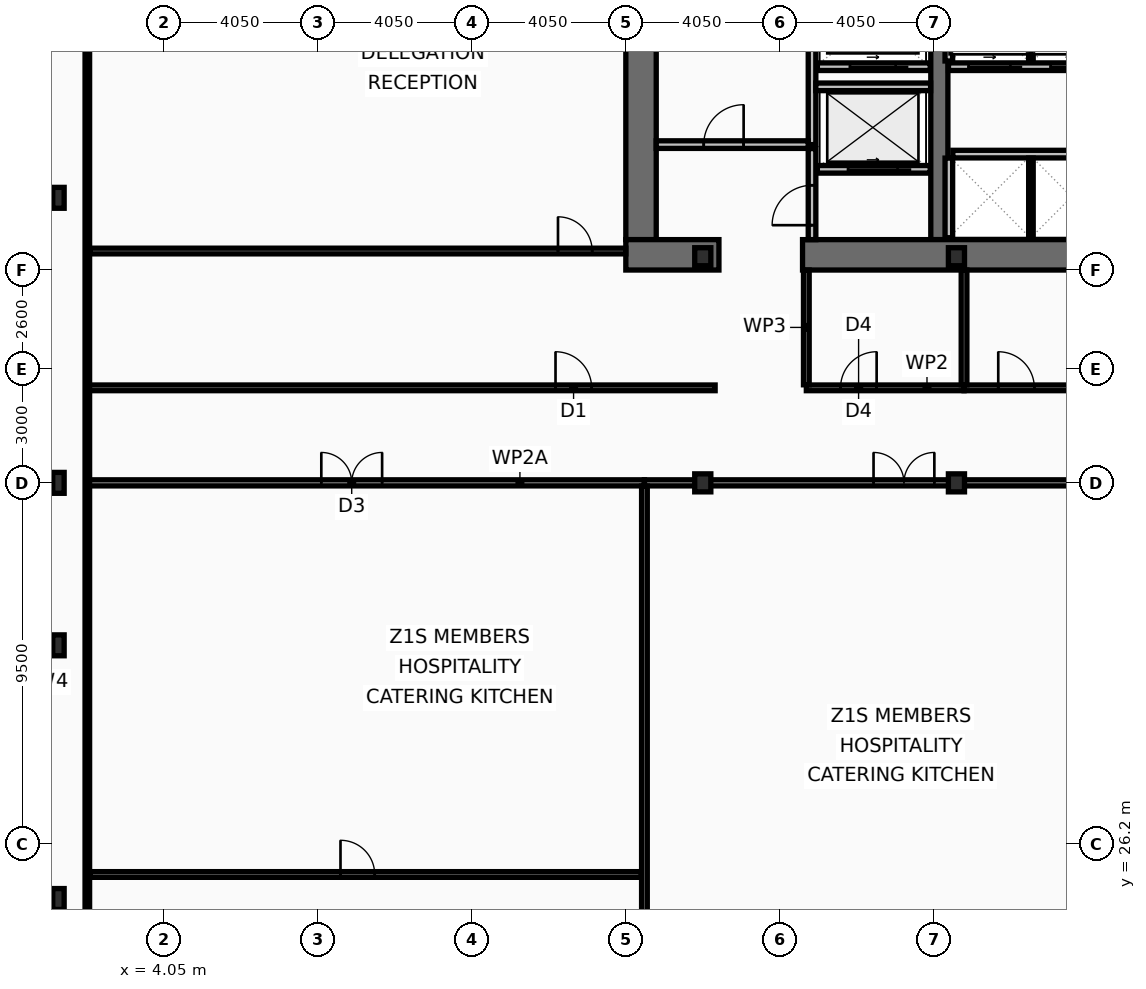
"""IFC4 building model, lengths in metres.
Left out: names, types, materials, properties, quantities, classifications, styles, units other than length and angle.
Written with IfcOpenShell. Run it as: python <this file> out.ifc"""

import sys

from ifc_helpers import new_model, si_unit, direction, frame, frame_2d, origin, origin_2d, place, context, subcontext, project, spatial, rectangle, i_section, extrude, element, fill, save


model = new_model("IFC4")
c1 = context("Model", 3, precision=1e-05, world=origin(), true_north=direction((0.0, 1.0)))
c2 = subcontext(c1, "Body", "Model", "MODEL_VIEW")
j1 = project(units=[si_unit("LENGTHUNIT", "METRE"), si_unit("PLANEANGLEUNIT", "RADIAN")], contexts=[c1])
p1 = place(None, origin())
s1 = spatial("IfcSite", under=j1, at=p1, CompositionType="ELEMENT")
p2 = place(p1, origin())
s2 = spatial("IfcBuilding", under=s1, at=p2, CompositionType="ELEMENT")
p3 = place(p2, frame((0.0, 0.0, 77.8)))
s3 = spatial("IfcBuildingStorey", under=s2, at=p3, CompositionType="ELEMENT", Elevation=77.8)
p4 = place(p3, frame((16.6, 42.1, 0.0), z_axis=(0.0, 0.0, 1.0), x_axis=(0.0, 1.0, 0.0)))
e1 = element("IfcWall", 1, at=p4, inside=s3, PredefinedType="SHEAR", context=c2, shape_type="SweptSolid", body=[
    extrude(rectangle(XDim=10.8, YDim=0.8, at=frame_2d((5.4, 0.0))), origin(), (0.0, 0.0, 1.0), 3.82),
])
p5 = place(p3, frame((24.45, 42.1, 0.0), z_axis=(0.0, 0.0, 1.0), x_axis=(0.0, 1.0, 0.0)))
e2 = element("IfcWall", 2, at=p5, inside=s3, PredefinedType="SHEAR", context=c2, shape_type="SweptSolid", body=[
    extrude(rectangle(XDim=10.8, YDim=0.45, at=frame_2d((5.4, 0.0))), origin(), (0.0, 0.0, 1.0), 3.82),
])
p6 = place(p3, frame((18.65, 41.7, 0.0), z_axis=(0.0, 0.0, 1.0), x_axis=(-1.0, 0.0, 0.0)))
e3 = element("IfcWall", 3, at=p6, inside=s3, PredefinedType="SHEAR", context=c2, shape_type="SweptSolid", body=[
    extrude(rectangle(XDim=2.45, YDim=0.8, at=frame_2d((1.225, 0.0))), origin(), (0.0, 0.0, 1.0), 3.82),
])
p7 = place(p3, frame((32.3, 41.7, 0.0), z_axis=(0.0, 0.0, 1.0), x_axis=(-1.0, 0.0, 0.0)))
e4 = element("IfcWall", 4, at=p7, inside=s3, PredefinedType="SHEAR", context=c2, shape_type="SweptSolid", body=[
    extrude(rectangle(XDim=11.45, YDim=0.8, at=frame_2d((5.725, 0.0))), origin(), (0.0, 0.0, 1.0), 3.82),
])
for number, where, z_axis, x_axis in (
    (5, (1.27, 24.75, 0.0), (0.0, 0.0, 1.0), (1.0, 0.0, 0.0)),
    (6, (1.27, 31.425, 0.0), (0.0, 0.0, 1.0), (1.0, 0.0, 0.0)),
    (7, (1.27, 35.7, 0.0), (0.0, 0.0, 1.0), (1.0, 0.0, 0.0)),
    (8, (1.27, 43.2, 0.0), (0.0, 0.0, 1.0), (1.0, 0.0, 0.0)),
):
    element("IfcColumn", number, at=place(p3, frame(where, z_axis=z_axis, x_axis=x_axis)), inside=s3, PredefinedType="COLUMN", context=c2, shape_type="SweptSolid", body=[
        extrude(i_section(OverallWidth=0.3, OverallDepth=0.55, WebThickness=0.015, FlangeThickness=0.029, at=origin_2d()), origin(), (0.0, 0.0, 1.0), 4.0),
    ])
for number, where, z_axis, x_axis in (
    (9, (18.225, 35.7, 0.0), (0.0, 0.0, 1.0), (1.0, 0.0, 0.0)),
    (10, (18.225, 41.65, 0.0), (0.0, 0.0, 1.0), (1.0, 0.0, 0.0)),
    (11, (24.9, 35.7, 0.0), (0.0, 0.0, 1.0), (1.0, 0.0, 0.0)),
    (12, (24.9, 41.65, 0.0), (0.0, 0.0, 1.0), (1.0, 0.0, 0.0)),
):
    element("IfcColumn", number, at=place(p3, frame(where, z_axis=z_axis, x_axis=x_axis)), inside=s3, PredefinedType="COLUMN", context=c2, shape_type="SweptSolid", body=[
        extrude(i_section(OverallWidth=0.424, OverallDepth=0.474, WebThickness=0.048, FlangeThickness=0.077, at=origin_2d()), origin(), (0.0, 0.0, 1.0), 4.0),
    ])
p8 = place(p3, frame((24.21, 43.95, 0.0), z_axis=(0.0, 0.0, 1.0), x_axis=(-1.0, 0.0, 0.0)))
e13 = element("IfcWall", 13, at=p8, inside=s3, PredefinedType="PARTITIONING", context=c2, shape_type="SweptSolid", body=[
    extrude(rectangle(XDim=2.97, YDim=0.2, at=frame_2d((1.485, 0.0))), origin(), (0.0, 0.0, 1.0), 3.82),
])
p9 = place(p8, frame((0.86, 0.0, 0.0)))
e14 = element("IfcOpeningElement", 14, at=p9, cuts=e13, PredefinedType="OPENING", context=c2, shape_type="SweptSolid", body=[
    extrude(rectangle(XDim=1.3, YDim=2.18, at=frame_2d((0.65, 1.09))), frame((0.0, 0.11, 0.0), z_axis=(0.0, -1.0, 0.0), x_axis=(1.0, 0.0, 0.0)), (0.0, 0.0, 1.0), 0.22),
])
p10 = place(p3, frame((24.21, 46.65, 0.0), z_axis=(0.0, 0.0, 1.0), x_axis=(-1.0, 0.0, 0.0)))
e15 = element("IfcWall", 15, at=p10, inside=s3, PredefinedType="PARTITIONING", context=c2, shape_type="SweptSolid", body=[
    extrude(rectangle(XDim=2.97, YDim=0.2, at=frame_2d((1.485, 0.0))), origin(), (0.0, 0.0, 1.0), 3.82),
])
p11 = place(p10, frame((0.91, 0.0, 0.0)))
e16 = element("IfcOpeningElement", 16, at=p11, cuts=e15, PredefinedType="OPENING", context=c2, shape_type="SweptSolid", body=[
    extrude(rectangle(XDim=1.2, YDim=2.18, at=frame_2d((0.6, 1.09))), frame((0.0, 0.11, 0.0), z_axis=(0.0, -1.0, 0.0), x_axis=(1.0, 0.0, 0.0)), (0.0, 0.0, 1.0), 0.22),
])
p12 = place(p3, frame((31.22, 46.65, 0.0), z_axis=(0.0, 0.0, 1.0), x_axis=(-1.0, 0.0, 0.0)))
e17 = element("IfcWall", 17, at=p12, inside=s3, PredefinedType="PARTITIONING", context=c2, shape_type="SweptSolid", body=[
    extrude(rectangle(XDim=6.53, YDim=0.2, at=frame_2d((3.265, 0.0))), origin(), (0.0, 0.0, 1.0), 3.82),
])
p13 = place(p12, frame((4.9, 0.0, 0.0)))
e18 = element("IfcOpeningElement", 18, at=p13, cuts=e17, PredefinedType="OPENING", context=c2, shape_type="SweptSolid", body=[
    extrude(rectangle(XDim=1.1, YDim=2.18, at=frame_2d((0.55, 1.09))), frame((0.0, 0.11, 0.0), z_axis=(0.0, -1.0, 0.0), x_axis=(1.0, 0.0, 0.0)), (0.0, 0.0, 1.0), 0.22),
])
p14 = place(p12, frame((2.74, 0.0, 0.0)))
e19 = element("IfcOpeningElement", 19, at=p14, cuts=e17, PredefinedType="OPENING", context=c2, shape_type="SweptSolid", body=[
    extrude(rectangle(XDim=1.1, YDim=2.18, at=frame_2d((0.55, 1.09))), frame((0.0, 0.11, 0.0), z_axis=(0.0, -1.0, 0.0), x_axis=(1.0, 0.0, 0.0)), (0.0, 0.0, 1.0), 0.22),
])
p15 = place(p12, frame((0.58, 0.0, 0.0)))
e20 = element("IfcOpeningElement", 20, at=p15, cuts=e17, PredefinedType="OPENING", context=c2, shape_type="SweptSolid", body=[
    extrude(rectangle(XDim=1.1, YDim=2.18, at=frame_2d((0.55, 1.09))), frame((0.0, 0.11, 0.0), z_axis=(0.0, -1.0, 0.0), x_axis=(1.0, 0.0, 0.0)), (0.0, 0.0, 1.0), 0.22),
])
p16 = place(p3, frame((21.1, 44.6, 0.0), z_axis=(0.0, 0.0, 1.0), x_axis=(0.0, 1.0, 0.0)))
e21 = element("IfcWall", 21, at=p16, inside=s3, PredefinedType="PARTITIONING", context=c2, shape_type="SweptSolid", body=[
    extrude(rectangle(XDim=4.3, YDim=0.2, at=frame_2d((2.15, 0.0))), origin(), (0.0, 0.0, 1.0), 3.82),
])
p17 = place(p3, frame((17.0, 44.6, 0.0), z_axis=(0.0, 0.0, 1.0), x_axis=(1.0, 0.0, 0.0)))
e22 = element("IfcWall", 22, at=p17, inside=s3, PredefinedType="PARTITIONING", context=c2, shape_type="SweptSolid", body=[
    extrude(rectangle(XDim=4.0, YDim=0.2, at=frame_2d((2.0, 0.0))), origin(), (0.0, 0.0, 1.0), 3.82),
])
p18 = place(p17, frame((1.25, 0.0, 0.0)))
e23 = element("IfcOpeningElement", 23, at=p18, cuts=e22, PredefinedType="OPENING", context=c2, shape_type="SweptSolid", body=[
    extrude(rectangle(XDim=1.05, YDim=2.15, at=frame_2d((0.525, 1.075))), frame((0.0, 0.11, 0.0), z_axis=(0.0, -1.0, 0.0), x_axis=(1.0, 0.0, 0.0)), (0.0, 0.0, 1.0), 0.22),
])
p19 = place(p3, frame((21.2, 46.12, 0.0), z_axis=(0.0, 0.0, 1.0), x_axis=(1.0, 0.0, 0.0)))
e24 = element("IfcWall", 24, at=p19, inside=s3, PredefinedType="PARTITIONING", context=c2, shape_type="SweptSolid", body=[
    extrude(rectangle(XDim=3.02, YDim=0.2, at=frame_2d((1.51, 0.0))), origin(), (0.0, 0.0, 1.0), 3.82),
])
p20 = place(p3, frame((21.1, 42.1, 0.0), z_axis=(0.0, 0.0, 1.0), x_axis=(0.0, 1.0, 0.0)))
e25 = element("IfcWall", 25, at=p20, inside=s3, PredefinedType="PARTITIONING", context=c2, shape_type="SweptSolid", body=[
    extrude(rectangle(XDim=2.395, YDim=0.2, at=frame_2d((1.198, 0.0))), origin(), (0.0, 0.0, 1.0), 3.82),
])
p21 = place(p20, frame((0.38, 0.0, 0.0)))
e26 = element("IfcOpeningElement", 26, at=p21, cuts=e25, PredefinedType="OPENING", context=c2, shape_type="SweptSolid", body=[
    extrude(rectangle(XDim=1.05, YDim=2.15, at=frame_2d((0.525, 1.075))), frame((0.0, 0.11, 0.0), z_axis=(0.0, -1.0, 0.0), x_axis=(1.0, 0.0, 0.0)), (0.0, 0.0, 1.0), 0.22),
])
p22 = place(p3, frame((24.7, 46.8, 0.0), z_axis=(0.0, 0.0, 1.0), x_axis=(0.0, 1.0, 0.0)))
e27 = element("IfcWall", 27, at=p22, inside=s3, PredefinedType="PARTITIONING", context=c2, shape_type="SweptSolid", body=[
    extrude(rectangle(XDim=2.095, YDim=0.2, at=frame_2d((1.047, 0.0))), origin(), (0.0, 0.0, 1.0), 3.82),
])
p23 = place(p3, frame((26.86, 46.8, 0.0), z_axis=(0.0, 0.0, 1.0), x_axis=(0.0, 1.0, 0.0)))
e28 = element("IfcWall", 28, at=p23, inside=s3, PredefinedType="PARTITIONING", context=c2, shape_type="SweptSolid", body=[
    extrude(rectangle(XDim=2.095, YDim=0.12, at=frame_2d((1.047, 0.0))), origin(), (0.0, 0.0, 1.0), 3.82),
])
p24 = place(p3, frame((24.805, 44.35, 0.0), z_axis=(0.0, 0.0, 1.0), x_axis=(1.0, 0.0, 0.0)))
e29 = element("IfcWall", 29, at=p24, inside=s3, PredefinedType="PARTITIONING", context=c2, shape_type="SweptSolid", body=[
    extrude(rectangle(XDim=6.27, YDim=0.2, at=frame_2d((3.135, 0.0))), origin(), (0.0, 0.0, 1.0), 3.82),
])
p25 = place(p3, frame((24.7, 42.15, 0.0), z_axis=(0.0, 0.0, 1.0), x_axis=(0.0, 1.0, 0.0)))
e30 = element("IfcWall", 30, at=p25, inside=s3, PredefinedType="PARTITIONING", context=c2, shape_type="SweptSolid", body=[
    extrude(rectangle(XDim=2.095, YDim=0.2, at=frame_2d((1.048, 0.0))), origin(), (0.0, 0.0, 1.0), 3.82),
])
p26 = place(p3, frame((26.86, 42.15, 0.0), z_axis=(0.0, 0.0, 1.0), x_axis=(0.0, 1.0, 0.0)))
e31 = element("IfcWall", 31, at=p26, inside=s3, PredefinedType="PARTITIONING", context=c2, shape_type="SweptSolid", body=[
    extrude(rectangle(XDim=2.095, YDim=0.12, at=frame_2d((1.048, 0.0))), origin(), (0.0, 0.0, 1.0), 3.82),
])
p27 = place(p3, frame((20.95, 38.2, 0.0), z_axis=(0.0, 0.0, 1.0), x_axis=(1.0, 0.0, 0.0)))
e32 = element("IfcWall", 32, at=p27, inside=s3, PredefinedType="PARTITIONING", context=c2, shape_type="SweptSolid", body=[
    extrude(rectangle(XDim=4.15, YDim=0.15, at=frame_2d((2.075, 0.0))), origin(), (0.0, 0.0, 1.0), 3.01),
])
p28 = place(p27, frame((0.9, 0.0, 0.0)))
e33 = element("IfcOpeningElement", 33, at=p28, cuts=e32, PredefinedType="OPENING", context=c2, shape_type="SweptSolid", body=[
    extrude(rectangle(XDim=0.95, YDim=2.05, at=frame_2d((0.475, 1.025))), frame((0.0, 0.085, 0.0), z_axis=(0.0, -1.0, 0.0), x_axis=(1.0, 0.0, 0.0)), (0.0, 0.0, 1.0), 0.17),
])
p29 = place(p3, frame((25.1, 38.2, 0.0), z_axis=(0.0, 0.0, 1.0), x_axis=(1.0, 0.0, 0.0)))
e34 = element("IfcWall", 34, at=p29, inside=s3, PredefinedType="PARTITIONING", context=c2, shape_type="SweptSolid", body=[
    extrude(rectangle(XDim=3.3, YDim=0.15, at=frame_2d((1.65, 0.0))), origin(), (0.0, 0.0, 1.0), 3.01),
])
p30 = place(p29, frame((0.9, 0.0, 0.0)))
e35 = element("IfcOpeningElement", 35, at=p30, cuts=e34, PredefinedType="OPENING", context=c2, shape_type="SweptSolid", body=[
    extrude(rectangle(XDim=0.95, YDim=2.05, at=frame_2d((0.475, 1.025))), frame((0.0, 0.085, 0.0), z_axis=(0.0, -1.0, 0.0), x_axis=(1.0, 0.0, 0.0)), (0.0, 0.0, 1.0), 0.17),
])
p31 = place(p3, frame((20.95, 38.28, 0.0), z_axis=(0.0, 0.0, 1.0), x_axis=(0.0, 1.0, 0.0)))
e36 = element("IfcWall", 36, at=p31, inside=s3, PredefinedType="PARTITIONING", context=c2, shape_type="SweptSolid", body=[
    extrude(rectangle(XDim=3.02, YDim=0.15, at=frame_2d((1.51, 0.0))), origin(), (0.0, 0.0, 1.0), 3.82),
])
p32 = place(p3, frame((25.1, 38.28, 0.0), z_axis=(0.0, 0.0, 1.0), x_axis=(0.0, 1.0, 0.0)))
e37 = element("IfcWall", 37, at=p32, inside=s3, PredefinedType="PARTITIONING", context=c2, shape_type="SweptSolid", body=[
    extrude(rectangle(XDim=3.02, YDim=0.15, at=frame_2d((1.51, 0.0))), origin(), (0.0, 0.0, 1.0), 3.01),
])
p33 = place(p3, frame((2.03, 38.2, 0.0), z_axis=(0.0, 0.0, 1.0), x_axis=(1.0, 0.0, 0.0)))
e38 = element("IfcWall", 38, at=p33, inside=s3, PredefinedType="PARTITIONING", context=c2, shape_type="SweptSolid", body=[
    extrude(rectangle(XDim=16.52, YDim=0.15, at=frame_2d((8.26, 0.0))), origin(), (0.0, 0.0, 1.0), 3.01),
])
p34 = place(p33, frame((12.32, 0.0, 0.0)))
e39 = element("IfcOpeningElement", 39, at=p34, cuts=e38, PredefinedType="OPENING", context=c2, shape_type="SweptSolid", body=[
    extrude(rectangle(XDim=0.95, YDim=2.05, at=frame_2d((0.475, 1.025))), frame((0.0, 0.085, 0.0), z_axis=(0.0, -1.0, 0.0), x_axis=(1.0, 0.0, 0.0)), (0.0, 0.0, 1.0), 0.17),
])
p35 = place(p3, frame((2.095, 41.8, 0.0), z_axis=(0.0, 0.0, 1.0), x_axis=(1.0, 0.0, 0.0)))
e40 = element("IfcWall", 40, at=p35, inside=s3, PredefinedType="PARTITIONING", context=c2, shape_type="SweptSolid", body=[
    extrude(rectangle(XDim=14.105, YDim=0.15, at=frame_2d((7.052, 0.0))), origin(), (0.0, 0.0, 1.0), 3.16),
])
p36 = place(p35, frame((12.32, 0.0, 0.0)))
e41 = element("IfcOpeningElement", 41, at=p36, cuts=e40, PredefinedType="OPENING", context=c2, shape_type="SweptSolid", body=[
    extrude(rectangle(XDim=0.9, YDim=2.05, at=frame_2d((0.45, 1.025))), frame((0.0, 0.085, 0.0), z_axis=(0.0, -1.0, 0.0), x_axis=(1.0, 0.0, 0.0)), (0.0, 0.0, 1.0), 0.17),
])
p37 = place(p3, frame((2.03, 35.7, 0.0), z_axis=(0.0, 0.0, 1.0), x_axis=(1.0, 0.0, 0.0)))
e42 = element("IfcWall", 42, at=p37, inside=s3, PredefinedType="PARTITIONING", context=c2, shape_type="SweptSolid", body=[
    extrude(rectangle(XDim=14.66, YDim=0.16, at=frame_2d((7.33, 0.0))), origin(), (0.0, 0.0, 1.0), 2.21),
])
p38 = place(p37, frame((6.157, 0.0, 0.0)))
e43 = element("IfcOpeningElement", 43, at=p38, cuts=e42, PredefinedType="OPENING", context=c2, shape_type="SweptSolid", body=[
    extrude(rectangle(XDim=1.6, YDim=2.15, at=frame_2d((0.8, 1.075))), frame((0.0, 0.09, 0.0), z_axis=(0.0, -1.0, 0.0), x_axis=(1.0, 0.0, 0.0)), (0.0, 0.0, 1.0), 0.18),
])
p39 = place(p3, frame((2.095, 25.395, 0.0), z_axis=(0.0, 0.0, 1.0), x_axis=(1.0, 0.0, 0.0)))
e44 = element("IfcWall", 44, at=p39, inside=s3, PredefinedType="PARTITIONING", context=c2, shape_type="SweptSolid", body=[
    extrude(rectangle(XDim=14.515, YDim=0.15, at=frame_2d((7.257, 0.0))), origin(), (0.0, 0.0, 1.0), 3.16),
])
p40 = place(p39, frame((6.597, 0.0, 0.0)))
e45 = element("IfcOpeningElement", 45, at=p40, cuts=e44, PredefinedType="OPENING", context=c2, shape_type="SweptSolid", body=[
    extrude(rectangle(XDim=0.9, YDim=2.05, at=frame_2d((0.45, 1.025))), frame((0.0, 0.085, 0.0), z_axis=(0.0, -1.0, 0.0), x_axis=(1.0, 0.0, 0.0)), (0.0, 0.0, 1.0), 0.17),
])
p41 = place(p3, frame((16.69, 35.7, 0.0), z_axis=(0.0, 0.0, 1.0), x_axis=(1.0, 0.0, 0.0)))
e46 = element("IfcWall", 46, at=p41, inside=s3, PredefinedType="PARTITIONING", context=c2, shape_type="SweptSolid", body=[
    extrude(rectangle(XDim=15.545, YDim=0.16, at=frame_2d((7.773, 0.0))), origin(), (0.0, 0.0, 1.0), 2.21),
])
p42 = place(p41, frame((6.029, 0.0, 0.0)))
e47 = element("IfcOpeningElement", 47, at=p42, cuts=e46, PredefinedType="OPENING", context=c2, shape_type="SweptSolid", body=[
    extrude(rectangle(XDim=1.6, YDim=2.15, at=frame_2d((0.8, 1.075))), frame((0.0, 0.09, 0.0), z_axis=(0.0, -1.0, 0.0), x_axis=(1.0, 0.0, 0.0)), (0.0, 0.0, 1.0), 0.18),
])
p43 = place(p3, frame((16.69, 10.665, 0.0), z_axis=(0.0, 0.0, 1.0), x_axis=(0.0, 1.0, 0.0)))
e48 = element("IfcWall", 48, at=p43, inside=s3, PredefinedType="PARTITIONING", context=c2, shape_type="SweptSolid", body=[
    extrude(rectangle(XDim=24.95, YDim=0.15, at=frame_2d((12.475, 0.0))), origin(), (0.0, 0.0, 1.0), 2.21),
])
p44 = place(p3, frame((2.03, 10.665, 0.0), z_axis=(0.0, 0.0, 1.0), x_axis=(0.0, 1.0, 0.0)))
e49 = element("IfcWall", 49, at=p44, inside=s3, PredefinedType="PARTITIONING", context=c2, shape_type="SweptSolid", body=[
    extrude(rectangle(XDim=42.11, YDim=0.12, at=frame_2d((21.055, 0.0))), origin(), (0.0, 0.0, 1.0), 2.21),
])
p45 = place(p9, origin())
e50 = element("IfcDoor", 50, at=p45, inside=s3, OperationType="SLIDING_TO_LEFT", PredefinedType="DOOR", context=c2, shape_type="SweptSolid", body=[
    extrude(rectangle(XDim=1.3, YDim=2.18, at=frame_2d((0.65, 1.09))), frame((0.0, 0.025, 0.0), z_axis=(0.0, -1.0, 0.0), x_axis=(1.0, 0.0, 0.0)), (0.0, 0.0, 1.0), 0.05),
])
fill(e14, e50)
p46 = place(p11, origin())
e51 = element("IfcDoor", 51, at=p46, inside=s3, OperationType="SLIDING_TO_LEFT", PredefinedType="DOOR", context=c2, shape_type="SweptSolid", body=[
    extrude(rectangle(XDim=1.2, YDim=2.18, at=frame_2d((0.6, 1.09))), frame((0.0, 0.025, 0.0), z_axis=(0.0, -1.0, 0.0), x_axis=(1.0, 0.0, 0.0)), (0.0, 0.0, 1.0), 0.05),
])
fill(e16, e51)
p47 = place(p13, origin())
e52 = element("IfcDoor", 52, at=p47, inside=s3, OperationType="SLIDING_TO_LEFT", PredefinedType="DOOR", context=c2, shape_type="SweptSolid", body=[
    extrude(rectangle(XDim=1.1, YDim=2.18, at=frame_2d((0.55, 1.09))), frame((0.0, 0.025, 0.0), z_axis=(0.0, -1.0, 0.0), x_axis=(1.0, 0.0, 0.0)), (0.0, 0.0, 1.0), 0.05),
])
fill(e18, e52)
p48 = place(p14, origin())
e53 = element("IfcDoor", 53, at=p48, inside=s3, OperationType="SLIDING_TO_LEFT", PredefinedType="DOOR", context=c2, shape_type="SweptSolid", body=[
    extrude(rectangle(XDim=1.1, YDim=2.18, at=frame_2d((0.55, 1.09))), frame((0.0, 0.025, 0.0), z_axis=(0.0, -1.0, 0.0), x_axis=(1.0, 0.0, 0.0)), (0.0, 0.0, 1.0), 0.05),
])
fill(e19, e53)
p49 = place(p18, origin())
e54 = element("IfcDoor", 54, at=p49, inside=s3, OperationType="SINGLE_SWING_RIGHT", PredefinedType="DOOR", context=c2, shape_type="SweptSolid", body=[
    extrude(rectangle(XDim=1.05, YDim=2.15, at=frame_2d((0.525, 1.075))), frame((0.0, 0.025, 0.0), z_axis=(0.0, -1.0, 0.0), x_axis=(1.0, 0.0, 0.0)), (0.0, 0.0, 1.0), 0.05),
])
fill(e23, e54)
p50 = place(p21, origin())
e55 = element("IfcDoor", 55, at=p50, inside=s3, OperationType="SINGLE_SWING_LEFT", PredefinedType="DOOR", context=c2, shape_type="SweptSolid", body=[
    extrude(rectangle(XDim=1.05, YDim=2.15, at=frame_2d((0.525, 1.075))), frame((0.0, 0.025, 0.0), z_axis=(0.0, -1.0, 0.0), x_axis=(1.0, 0.0, 0.0)), (0.0, 0.0, 1.0), 0.05),
])
fill(e26, e55)
p51 = place(p28, origin())
e56 = element("IfcDoor", 56, at=p51, inside=s3, OperationType="SINGLE_SWING_RIGHT", PredefinedType="DOOR", context=c2, shape_type="SweptSolid", body=[
    extrude(rectangle(XDim=0.95, YDim=2.05, at=frame_2d((0.475, 1.025))), frame((0.0, 0.025, 0.0), z_axis=(0.0, -1.0, 0.0), x_axis=(1.0, 0.0, 0.0)), (0.0, 0.0, 1.0), 0.05),
])
fill(e33, e56)
p52 = place(p30, origin())
e57 = element("IfcDoor", 57, at=p52, inside=s3, OperationType="SINGLE_SWING_LEFT", PredefinedType="DOOR", context=c2, shape_type="SweptSolid", body=[
    extrude(rectangle(XDim=0.95, YDim=2.05, at=frame_2d((0.475, 1.025))), frame((0.0, 0.025, 0.0), z_axis=(0.0, -1.0, 0.0), x_axis=(1.0, 0.0, 0.0)), (0.0, 0.0, 1.0), 0.05),
])
fill(e35, e57)
p53 = place(p34, origin())
e58 = element("IfcDoor", 58, at=p53, inside=s3, OperationType="SINGLE_SWING_LEFT", PredefinedType="DOOR", context=c2, shape_type="SweptSolid", body=[
    extrude(rectangle(XDim=0.95, YDim=2.05, at=frame_2d((0.475, 1.025))), frame((0.0, 0.025, 0.0), z_axis=(0.0, -1.0, 0.0), x_axis=(1.0, 0.0, 0.0)), (0.0, 0.0, 1.0), 0.05),
])
fill(e39, e58)
p54 = place(p36, origin())
e59 = element("IfcDoor", 59, at=p54, inside=s3, OperationType="SINGLE_SWING_LEFT", PredefinedType="DOOR", context=c2, shape_type="SweptSolid", body=[
    extrude(rectangle(XDim=0.9, YDim=2.05, at=frame_2d((0.45, 1.025))), frame((0.0, 0.025, 0.0), z_axis=(0.0, -1.0, 0.0), x_axis=(1.0, 0.0, 0.0)), (0.0, 0.0, 1.0), 0.05),
])
fill(e41, e59)
p55 = place(p38, origin())
e60 = element("IfcDoor", 60, at=p55, inside=s3, OperationType="DOUBLE_DOOR_SINGLE_SWING", PredefinedType="DOOR", context=c2, shape_type="SweptSolid", body=[
    extrude(rectangle(XDim=1.6, YDim=2.15, at=frame_2d((0.8, 1.075))), frame((0.0, 0.025, 0.0), z_axis=(0.0, -1.0, 0.0), x_axis=(1.0, 0.0, 0.0)), (0.0, 0.0, 1.0), 0.05),
])
fill(e43, e60)
p56 = place(p40, origin())
e61 = element("IfcDoor", 61, at=p56, inside=s3, OperationType="SINGLE_SWING_LEFT", PredefinedType="DOOR", context=c2, shape_type="SweptSolid", body=[
    extrude(rectangle(XDim=0.9, YDim=2.05, at=frame_2d((0.45, 1.025))), frame((0.0, 0.025, 0.0), z_axis=(0.0, -1.0, 0.0), x_axis=(1.0, 0.0, 0.0)), (0.0, 0.0, 1.0), 0.05),
])
fill(e45, e61)
p57 = place(p42, origin())
e62 = element("IfcDoor", 62, at=p57, inside=s3, OperationType="DOUBLE_DOOR_SINGLE_SWING", PredefinedType="DOOR", context=c2, shape_type="SweptSolid", body=[
    extrude(rectangle(XDim=1.6, YDim=2.15, at=frame_2d((0.8, 1.075))), frame((0.0, 0.025, 0.0), z_axis=(0.0, -1.0, 0.0), x_axis=(1.0, 0.0, 0.0)), (0.0, 0.0, 1.0), 0.05),
])
fill(e47, e62)
save(model, sys.argv[1])
